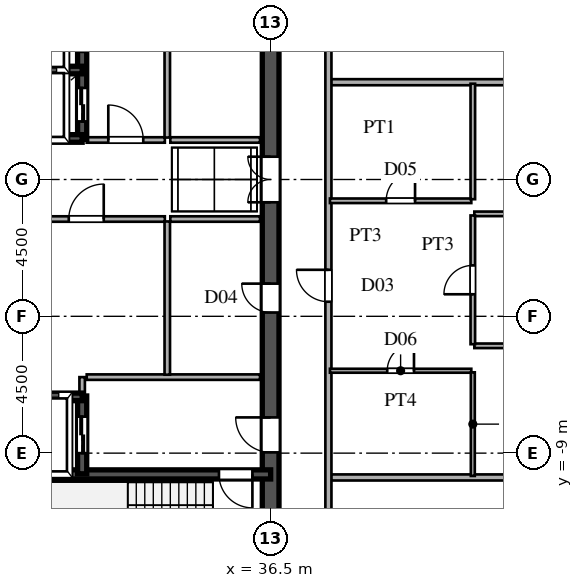
"""IFC4 building model, lengths in metres.
Left out: names, types, materials, properties, quantities, classifications, styles, units other than length and angle.
Written with IfcOpenShell. Run it as: python <this file> out.ifc"""

import sys

from ifc_helpers import new_model, si_unit, direction, frame, frame_2d, origin, place, context, subcontext, project, spatial, rectangle, extrude, source, transform, mapped, element, fill, save


model = new_model("IFC4")
c1 = context("Model", 3, precision=1e-05, world=origin(), true_north=direction((0.0, 1.0)))
c2 = subcontext(c1, "Body", "Model", "MODEL_VIEW")
j1 = project(units=[si_unit("LENGTHUNIT", "METRE"), si_unit("PLANEANGLEUNIT", "RADIAN")], contexts=[c1])
p1 = place(None, origin())
s1 = spatial("IfcSite", under=j1, at=p1, CompositionType="ELEMENT")
p2 = place(p1, origin())
s2 = spatial("IfcBuilding", under=s1, at=p2, CompositionType="ELEMENT")
p3 = place(p2, frame((0.0, 0.0, 185.1)))
s3 = spatial("IfcBuildingStorey", under=s2, at=p3, CompositionType="ELEMENT", Elevation=185.1)
p4 = place(p3, frame((36.5, -13.65, 0.0), z_axis=(0.0, 0.0, 1.0), x_axis=(0.0, 1.0, 0.0)))
e1 = element("IfcWall", 1, at=p4, inside=s3, PredefinedType="SHEAR", context=c2, shape_type="SweptSolid", body=[
    extrude(rectangle(XDim=7.15, YDim=0.55, at=frame_2d((3.575, 0.0))), origin(), (0.0, 0.0, 1.0), 3.38),
])
p5 = place(p4, frame((4.675, 0.0, 0.0)))
e2 = element("IfcOpeningElement", 2, at=p5, cuts=e1, PredefinedType="OPENING", context=c2, shape_type="SweptSolid", body=[
    extrude(rectangle(XDim=1.15, YDim=2.2, at=frame_2d((0.575, 1.1))), frame((0.0, 0.285, 0.0), z_axis=(0.0, -1.0, 0.0), x_axis=(1.0, 0.0, 0.0)), (0.0, 0.0, 1.0), 0.57),
])
p6 = place(p3, frame((36.5, -1.3, 0.0), z_axis=(0.0, 0.0, 1.0), x_axis=(0.0, 1.0, 0.0)))
e3 = element("IfcWall", 3, at=p6, inside=s3, PredefinedType="SHEAR", context=c2, shape_type="SweptSolid", body=[
    extrude(rectangle(XDim=2.6, YDim=0.55, at=frame_2d((1.3, 0.0))), origin(), (0.0, 0.0, 1.0), 3.38),
])
p7 = place(p6, frame((0.55, 0.0, 0.0)))
e4 = element("IfcOpeningElement", 4, at=p7, cuts=e3, PredefinedType="OPENING", context=c2, shape_type="SweptSolid", body=[
    extrude(rectangle(XDim=1.5, YDim=2.3, at=frame_2d((0.75, 1.15))), frame((0.0, 0.285, 0.0), z_axis=(0.0, -1.0, 0.0), x_axis=(1.0, 0.0, 0.0)), (0.0, 0.0, 1.0), 0.57),
])
p8 = place(p3, frame((36.5, -6.5, 0.0), z_axis=(0.0, 0.0, 1.0), x_axis=(0.0, 1.0, 0.0)))
e5 = element("IfcWall", 5, at=p8, inside=s3, PredefinedType="SHEAR", context=c2, shape_type="SweptSolid", body=[
    extrude(rectangle(XDim=5.2, YDim=0.55, at=frame_2d((2.6, 0.0))), origin(), (0.0, 0.0, 1.0), 3.38),
])
p9 = place(p8, frame((2.125, 0.0, 0.0)))
e6 = element("IfcOpeningElement", 6, at=p9, cuts=e5, PredefinedType="OPENING", context=c2, shape_type="SweptSolid", body=[
    extrude(rectangle(XDim=0.95, YDim=2.15, at=frame_2d((0.475, 1.075))), frame((0.0, 0.285, 0.0), z_axis=(0.0, -1.0, 0.0), x_axis=(1.0, 0.0, 0.0)), (0.0, 0.0, 1.0), 0.57),
])
p10 = place(p3, frame((36.5, 1.3, 0.0), z_axis=(0.0, 0.0, 1.0), x_axis=(0.0, 1.0, 0.0)))
e7 = element("IfcWall", 7, at=p10, inside=s3, PredefinedType="SHEAR", context=c2, shape_type="SweptSolid", body=[
    extrude(rectangle(XDim=6.9, YDim=0.55, at=frame_2d((3.45, 0.0))), origin(), (0.0, 0.0, 1.0), 3.38),
])
p11 = place(p10, frame((2.975, 0.0, 0.0)))
e8 = element("IfcOpeningElement", 8, at=p11, cuts=e7, PredefinedType="OPENING", context=c2, shape_type="SweptSolid", body=[
    extrude(rectangle(XDim=0.95, YDim=2.15, at=frame_2d((0.475, 1.075))), frame((0.0, 0.285, 0.0), z_axis=(0.0, -1.0, 0.0), x_axis=(1.0, 0.0, 0.0)), (0.0, 0.0, 1.0), 0.57),
])
p12 = place(p3, frame((27.5, -9.7, 0.0), z_axis=(0.0, 0.0, 1.0), x_axis=(1.0, 0.0, 0.0)))
e9 = element("IfcWall", 9, at=p12, inside=s3, PredefinedType="SHEAR", context=c2, shape_type="SweptSolid", body=[
    extrude(rectangle(XDim=9.0, YDim=0.3, at=frame_2d((4.5, 0.0))), origin(), (0.0, 0.0, 1.0), 3.38),
])
p13 = place(p12, frame((7.3, 0.0, 0.0)))
e10 = element("IfcOpeningElement", 10, at=p13, cuts=e9, PredefinedType="OPENING", context=c2, shape_type="SweptSolid", body=[
    extrude(rectangle(XDim=1.1, YDim=2.2, at=frame_2d((0.55, 1.1))), frame((0.0, 0.16, 0.0), z_axis=(0.0, -1.0, 0.0), x_axis=(1.0, 0.0, 0.0)), (0.0, 0.0, 1.0), 0.32),
])
for number, where, z_axis, x_axis in (
    (11, (27.5, -7.15, 0.0), (0.0, 0.0, 1.0), (1.0, 0.0, 0.0)),
    (12, (27.5, 1.35, 0.0), (0.0, 0.0, 1.0), (1.0, 0.0, 0.0)),
    (13, (27.5, 3.6, 0.0), (0.0, 0.0, 1.0), (1.0, 0.0, 0.0)),
):
    element("IfcWall", number, at=place(p3, frame(where, z_axis=z_axis, x_axis=x_axis)), inside=s3, PredefinedType="SHEAR", context=c2, shape_type="SweptSolid", body=[
        extrude(rectangle(XDim=2.8, YDim=0.25, at=frame_2d((1.4, 0.0))), origin(), (0.0, 0.0, 1.0), 3.38),
    ])
p14 = place(p3, frame((30.3, -9.68, 0.0), z_axis=(0.0, 0.0, 1.0), x_axis=(0.0, 1.0, 0.0)))
e14 = element("IfcWall", 14, at=p14, inside=s3, PredefinedType="SHEAR", context=c2, shape_type="SweptSolid", body=[
    extrude(rectangle(XDim=2.56, YDim=0.3, at=frame_2d((1.28, 0.0))), origin(), (0.0, 0.0, 1.0), 3.38),
])
p15 = place(p14, frame((0.68, 0.0, 0.0)))
e15 = element("IfcOpeningElement", 15, at=p15, cuts=e14, PredefinedType="OPENING", context=c2, shape_type="SweptSolid", body=[
    extrude(rectangle(XDim=1.2, YDim=2.25, at=frame_2d((0.6, 1.125))), frame((0.0, 0.16, 0.0), z_axis=(0.0, -1.0, 0.0), x_axis=(1.0, 0.0, 0.0)), (0.0, 0.0, 1.0), 0.32),
])
p16 = place(p3, frame((30.3, 1.32, 0.0), z_axis=(0.0, 0.0, 1.0), x_axis=(0.0, 1.0, 0.0)))
e16 = element("IfcWall", 16, at=p16, inside=s3, PredefinedType="SHEAR", context=c2, shape_type="SweptSolid", body=[
    extrude(rectangle(XDim=2.28, YDim=0.3, at=frame_2d((1.14, 0.0))), origin(), (0.0, 0.0, 1.0), 3.38),
])
p17 = place(p16, frame((0.59, 0.0, 0.0)))
e17 = element("IfcOpeningElement", 17, at=p17, cuts=e16, PredefinedType="OPENING", context=c2, shape_type="SweptSolid", body=[
    extrude(rectangle(XDim=1.1, YDim=2.2, at=frame_2d((0.55, 1.1))), frame((0.0, 0.16, 0.0), z_axis=(0.0, -1.0, 0.0), x_axis=(1.0, 0.0, 0.0)), (0.0, 0.0, 1.0), 0.32),
])
p18 = place(p3, frame((30.3, 3.6, 0.0), z_axis=(0.0, 0.0, 1.0), x_axis=(0.0, 1.0, 0.0)))
e18 = element("IfcWall", 18, at=p18, inside=s3, PredefinedType="SHEAR", context=c2, shape_type="SweptSolid", body=[
    extrude(rectangle(XDim=2.3, YDim=0.3, at=frame_2d((1.15, 0.0))), origin(), (0.0, 0.0, 1.0), 3.38),
])
p19 = place(p18, frame((0.6, 0.0, 0.0)))
e19 = element("IfcOpeningElement", 19, at=p19, cuts=e18, PredefinedType="OPENING", context=c2, shape_type="SweptSolid", body=[
    extrude(rectangle(XDim=1.1, YDim=2.2, at=frame_2d((0.55, 1.1))), frame((0.0, 0.16, 0.0), z_axis=(0.0, -1.0, 0.0), x_axis=(1.0, 0.0, 0.0)), (0.0, 0.0, 1.0), 0.32),
])
p20 = place(p3, frame((30.45, -6.5, 0.0), z_axis=(0.0, 0.0, 1.0), x_axis=(1.0, 0.0, 0.0)))
e20 = element("IfcWall", 20, at=p20, inside=s3, PredefinedType="PARTITIONING", context=c2, shape_type="SweptSolid", body=[
    extrude(rectangle(XDim=5.7, YDim=0.18, at=frame_2d((2.85, 0.0))), origin(), (0.0, 0.0, 1.0), 3.38),
])
p21 = place(p3, frame((30.3, -7.12, 0.0), z_axis=(0.0, 0.0, 1.0), x_axis=(0.0, 1.0, 0.0)))
e21 = element("IfcWall", 21, at=p21, inside=s3, PredefinedType="PARTITIONING", context=c2, shape_type="SweptSolid", body=[
    extrude(rectangle(XDim=0.62, YDim=0.18, at=frame_2d((0.31, 0.0))), origin(), (0.0, 0.0, 1.0), 3.38),
])
p22 = place(p3, frame((33.1, -6.42, 0.0), z_axis=(0.0, 0.0, 1.0), x_axis=(0.0, 1.0, 0.0)))
e22 = element("IfcWall", 22, at=p22, inside=s3, PredefinedType="PARTITIONING", context=c2, shape_type="SweptSolid", body=[
    extrude(rectangle(XDim=5.04, YDim=0.18, at=frame_2d((2.52, 0.0))), origin(), (0.0, 0.0, 1.0), 3.38),
])
p23 = place(p3, frame((33.1, 1.38, 0.0), z_axis=(0.0, 0.0, 1.0), x_axis=(0.0, 1.0, 0.0)))
e23 = element("IfcWall", 23, at=p23, inside=s3, PredefinedType="PARTITIONING", context=c2, shape_type="SweptSolid", body=[
    extrude(rectangle(XDim=6.74, YDim=0.18, at=frame_2d((3.37, 0.0))), origin(), (0.0, 0.0, 1.0), 3.38),
])
p24 = place(p3, frame((27.85, -1.3, 0.0), z_axis=(0.0, 0.0, 1.0), x_axis=(1.0, 0.0, 0.0)))
e24 = element("IfcWall", 24, at=p24, inside=s3, PredefinedType="PARTITIONING", context=c2, shape_type="SweptSolid", body=[
    extrude(rectangle(XDim=5.17, YDim=0.18, at=frame_2d((2.585, 0.0))), origin(), (0.0, 0.0, 1.0), 3.38),
])
p25 = place(p24, frame((2.01, 0.0, 0.0)))
e25 = element("IfcOpeningElement", 25, at=p25, cuts=e24, PredefinedType="OPENING", context=c2, shape_type="SweptSolid", body=[
    extrude(rectangle(XDim=1.15, YDim=2.2, at=frame_2d((0.575, 1.1))), frame((0.0, 0.1, 0.0), z_axis=(0.0, -1.0, 0.0), x_axis=(1.0, 0.0, 0.0)), (0.0, 0.0, 1.0), 0.2),
])
p26 = place(p3, frame((30.45, 1.3, 0.0), z_axis=(0.0, 0.0, 1.0), x_axis=(1.0, 0.0, 0.0)))
e26 = element("IfcWall", 26, at=p26, inside=s3, PredefinedType="PARTITIONING", context=c2, shape_type="SweptSolid", body=[
    extrude(rectangle(XDim=2.57, YDim=0.18, at=frame_2d((1.285, 0.0))), origin(), (0.0, 0.0, 1.0), 3.38),
])
p27 = place(p26, frame((0.71, 0.0, 0.0)))
e27 = element("IfcOpeningElement", 27, at=p27, cuts=e26, PredefinedType="OPENING", context=c2, shape_type="SweptSolid", body=[
    extrude(rectangle(XDim=1.15, YDim=2.2, at=frame_2d((0.575, 1.1))), frame((0.0, 0.1, 0.0), z_axis=(0.0, -1.0, 0.0), x_axis=(1.0, 0.0, 0.0)), (0.0, 0.0, 1.0), 0.2),
])
for number, where, z_axis, x_axis in (
    (28, (33.2, -1.3, 0.0), (0.0, 0.0, 1.0), (1.0, 0.0, 0.0)),
    (29, (33.2, 1.3, 0.0), (0.0, 0.0, 1.0), (1.0, 0.0, 0.0)),
):
    element("IfcWall", number, at=place(p3, frame(where, z_axis=z_axis, x_axis=x_axis)), inside=s3, PredefinedType="PARTITIONING", context=c2, shape_type="SweptSolid", body=[
        extrude(rectangle(XDim=2.95, YDim=0.18, at=frame_2d((1.475, 0.0))), origin(), (0.0, 0.0, 1.0), 3.38),
    ])
p28 = place(p3, frame((38.48, -9.8, 0.0), z_axis=(0.0, 0.0, 1.0), x_axis=(1.0, 0.0, 0.0)))
e30 = element("IfcWall", 30, at=p28, inside=s3, PredefinedType="PARTITIONING", context=c2, shape_type="SweptSolid", body=[
    extrude(rectangle(XDim=18.163, YDim=0.2, at=frame_2d((9.082, 0.0))), origin(), (0.0, 0.0, 1.0), 3.38),
])
p29 = place(p3, frame((38.45, -6.29, 0.0), z_axis=(0.0, 0.0, 1.0), x_axis=(1.0, 0.0, 0.0)))
e31 = element("IfcWall", 31, at=p29, inside=s3, PredefinedType="PARTITIONING", context=c2, shape_type="SweptSolid", body=[
    extrude(rectangle(XDim=4.65, YDim=0.13, at=frame_2d((2.325, 0.0))), origin(), (0.0, 0.0, 1.0), 3.38),
])
p30 = place(p29, frame((1.885, 0.0, 0.0)))
e32 = element("IfcOpeningElement", 32, at=p30, cuts=e31, PredefinedType="OPENING", context=c2, shape_type="SweptSolid", body=[
    extrude(rectangle(XDim=0.88, YDim=2.1, at=frame_2d((0.44, 1.05))), frame((0.0, 0.075, 0.0), z_axis=(0.0, -1.0, 0.0), x_axis=(1.0, 0.0, 0.0)), (0.0, 0.0, 1.0), 0.15),
])
p31 = place(p3, frame((43.2, -5.47, 0.0), z_axis=(0.0, 0.0, 1.0), x_axis=(1.0, 0.0, 0.0)))
e33 = element("IfcWall", 33, at=p31, inside=s3, PredefinedType="PARTITIONING", context=c2, shape_type="SweptSolid", body=[
    extrude(rectangle(XDim=21.259, YDim=0.15, at=frame_2d((10.629, 0.0))), origin(), (0.0, 0.0, 1.0), 3.38),
])
p32 = place(p31, frame((5.15, 0.0, 0.0)))
e34 = element("IfcOpeningElement", 34, at=p32, cuts=e33, PredefinedType="OPENING", context=c2, shape_type="SweptSolid", body=[
    extrude(rectangle(XDim=0.95, YDim=2.15, at=frame_2d((0.475, 1.075))), frame((0.0, 0.085, 0.0), z_axis=(0.0, -1.0, 0.0), x_axis=(1.0, 0.0, 0.0)), (0.0, 0.0, 1.0), 0.17),
])
p33 = place(p31, frame((13.675, 0.0, 0.0)))
e35 = element("IfcOpeningElement", 35, at=p33, cuts=e33, PredefinedType="OPENING", context=c2, shape_type="SweptSolid", body=[
    extrude(rectangle(XDim=0.95, YDim=2.15, at=frame_2d((0.475, 1.075))), frame((0.0, 0.085, 0.0), z_axis=(0.0, -1.0, 0.0), x_axis=(1.0, 0.0, 0.0)), (0.0, 0.0, 1.0), 0.17),
])
p34 = place(p3, frame((43.2, -1.13, 0.0), z_axis=(0.0, 0.0, 1.0), x_axis=(1.0, 0.0, 0.0)))
e36 = element("IfcWall", 36, at=p34, inside=s3, PredefinedType="PARTITIONING", context=c2, shape_type="SweptSolid", body=[
    extrude(rectangle(XDim=25.335, YDim=0.15, at=frame_2d((12.667, 0.0))), origin(), (0.0, 0.0, 1.0), 3.38),
])
p35 = place(p34, frame((5.15, 0.0, 0.0)))
e37 = element("IfcOpeningElement", 37, at=p35, cuts=e36, PredefinedType="OPENING", context=c2, shape_type="SweptSolid", body=[
    extrude(rectangle(XDim=0.95, YDim=2.15, at=frame_2d((0.475, 1.075))), frame((0.0, 0.085, 0.0), z_axis=(0.0, -1.0, 0.0), x_axis=(1.0, 0.0, 0.0)), (0.0, 0.0, 1.0), 0.17),
])
p36 = place(p34, frame((20.675, 0.0, 0.0)))
e38 = element("IfcOpeningElement", 38, at=p36, cuts=e36, PredefinedType="OPENING", context=c2, shape_type="SweptSolid", body=[
    extrude(rectangle(XDim=0.95, YDim=2.15, at=frame_2d((0.475, 1.075))), frame((0.0, 0.085, 0.0), z_axis=(0.0, -1.0, 0.0), x_axis=(1.0, 0.0, 0.0)), (0.0, 0.0, 1.0), 0.17),
])
p37 = place(p34, frame((13.675, 0.0, 0.0)))
e39 = element("IfcOpeningElement", 39, at=p37, cuts=e36, PredefinedType="OPENING", context=c2, shape_type="SweptSolid", body=[
    extrude(rectangle(XDim=0.95, YDim=2.15, at=frame_2d((0.475, 1.075))), frame((0.0, 0.085, 0.0), z_axis=(0.0, -1.0, 0.0), x_axis=(1.0, 0.0, 0.0)), (0.0, 0.0, 1.0), 0.17),
])
p38 = place(p3, frame((38.45, -0.7, 0.0), z_axis=(0.0, 0.0, 1.0), x_axis=(1.0, 0.0, 0.0)))
e40 = element("IfcWall", 40, at=p38, inside=s3, PredefinedType="PARTITIONING", context=c2, shape_type="SweptSolid", body=[
    extrude(rectangle(XDim=4.65, YDim=0.15, at=frame_2d((2.325, 0.0))), origin(), (0.0, 0.0, 1.0), 3.38),
])
p39 = place(p38, frame((1.85, 0.0, 0.0)))
e41 = element("IfcOpeningElement", 41, at=p39, cuts=e40, PredefinedType="OPENING", context=c2, shape_type="SweptSolid", body=[
    extrude(rectangle(XDim=0.95, YDim=2.15, at=frame_2d((0.475, 1.075))), frame((0.0, 0.085, 0.0), z_axis=(0.0, -1.0, 0.0), x_axis=(1.0, 0.0, 0.0)), (0.0, 0.0, 1.0), 0.17),
])
p40 = place(p3, frame((38.48, 3.2, 0.0), z_axis=(0.0, 0.0, 1.0), x_axis=(1.0, 0.0, 0.0)))
e42 = element("IfcWall", 42, at=p40, inside=s3, PredefinedType="PARTITIONING", context=c2, shape_type="SweptSolid", body=[
    extrude(rectangle(XDim=29.763, YDim=0.2, at=frame_2d((14.881, 0.0))), origin(), (0.0, 0.0, 1.0), 3.38),
])
p41 = place(p3, frame((38.4, -15.715, 0.0), z_axis=(0.0, 0.0, 1.0), x_axis=(0.0, 1.0, 0.0)))
e43 = element("IfcWall", 43, at=p41, inside=s3, PredefinedType="PARTITIONING", context=c2, shape_type="SweptSolid", body=[
    extrude(rectangle(XDim=31.43, YDim=0.2, at=frame_2d((15.715, 0.0))), origin(), (0.0, 0.0, 1.0), 3.38),
])
p42 = place(p41, frame((2.39, 0.0, 0.0)))
e44 = element("IfcOpeningElement", 44, at=p42, cuts=e43, PredefinedType="OPENING", context=c2, shape_type="SweptSolid", body=[
    extrude(rectangle(XDim=1.05, YDim=2.25, at=frame_2d((0.525, 1.125))), frame((0.0, 0.11, 0.0), z_axis=(0.0, -1.0, 0.0), x_axis=(1.0, 0.0, 0.0)), (0.0, 0.0, 1.0), 0.22),
])
p43 = place(p41, frame((11.695, 0.0, 0.0)))
e45 = element("IfcOpeningElement", 45, at=p43, cuts=e43, PredefinedType="OPENING", context=c2, shape_type="SweptSolid", body=[
    extrude(rectangle(XDim=1.05, YDim=2.25, at=frame_2d((0.525, 1.125))), frame((0.0, 0.11, 0.0), z_axis=(0.0, -1.0, 0.0), x_axis=(1.0, 0.0, 0.0)), (0.0, 0.0, 1.0), 0.22),
])
p44 = place(p41, frame((24.69, 0.0, 0.0)))
e46 = element("IfcOpeningElement", 46, at=p44, cuts=e43, PredefinedType="OPENING", context=c2, shape_type="SweptSolid", body=[
    extrude(rectangle(XDim=1.05, YDim=2.25, at=frame_2d((0.525, 1.125))), frame((0.0, 0.11, 0.0), z_axis=(0.0, -1.0, 0.0), x_axis=(1.0, 0.0, 0.0)), (0.0, 0.0, 1.0), 0.22),
])
p45 = place(p3, frame((43.15, -9.75, 0.0), z_axis=(0.0, 0.0, 1.0), x_axis=(0.0, 1.0, 0.0)))
e47 = element("IfcWall", 47, at=p45, inside=s3, PredefinedType="PARTITIONING", context=c2, shape_type="SweptSolid", body=[
    extrude(rectangle(XDim=3.408, YDim=0.13, at=frame_2d((1.704, 0.0))), origin(), (0.0, 0.0, 1.0), 3.38),
])
p46 = place(p3, frame((43.15, -5.417, 0.0), z_axis=(0.0, 0.0, 1.0), x_axis=(0.0, 1.0, 0.0)))
e48 = element("IfcWall", 48, at=p46, inside=s3, PredefinedType="PARTITIONING", context=c2, shape_type="SweptSolid", body=[
    extrude(rectangle(XDim=4.234, YDim=0.15, at=frame_2d((2.117, 0.0))), origin(), (0.0, 0.0, 1.0), 2.99),
])
p47 = place(p46, frame((1.642, 0.0, 0.0)))
e49 = element("IfcOpeningElement", 49, at=p47, cuts=e48, PredefinedType="OPENING", context=c2, shape_type="SweptSolid", body=[
    extrude(rectangle(XDim=0.95, YDim=2.15, at=frame_2d((0.475, 1.075))), frame((0.0, 0.085, 0.0), z_axis=(0.0, -1.0, 0.0), x_axis=(1.0, 0.0, 0.0)), (0.0, 0.0, 1.0), 0.17),
])
p48 = place(p3, frame((43.15, -0.648, 0.0), z_axis=(0.0, 0.0, 1.0), x_axis=(0.0, 1.0, 0.0)))
e50 = element("IfcWall", 50, at=p48, inside=s3, PredefinedType="PARTITIONING", context=c2, shape_type="SweptSolid", body=[
    extrude(rectangle(XDim=3.798, YDim=0.15, at=frame_2d((1.899, 0.0))), origin(), (0.0, 0.0, 1.0), 3.38),
])
m1 = source(origin(), c2, "Body", "SweptSolid", [
    extrude(rectangle(XDim=1.15, YDim=2.2, at=frame_2d((0.575, 1.1))), frame((0.0, 0.025, 0.0), z_axis=(0.0, -1.0, 0.0), x_axis=(1.0, 0.0, 0.0)), (0.0, 0.0, 1.0), 0.05),
])
p49 = place(p5, origin())
e51 = element("IfcDoor", 51, at=p49, inside=s3, OperationType="SINGLE_SWING_RIGHT", PredefinedType="DOOR", context=c2, shape_type="MappedRepresentation", body=[
    mapped(m1, transform((0.0, 0.0, 0.0), scale=1.0)),
])
fill(e2, e51)
m2 = source(origin(), c2, "Body", "SweptSolid", [
    extrude(rectangle(XDim=1.5, YDim=2.3, at=frame_2d((0.75, 1.15))), frame((0.0, 0.025, 0.0), z_axis=(0.0, -1.0, 0.0), x_axis=(1.0, 0.0, 0.0)), (0.0, 0.0, 1.0), 0.05),
])
p50 = place(p7, origin())
e52 = element("IfcDoor", 52, at=p50, inside=s3, OperationType="DOUBLE_SWING_LEFT", PredefinedType="DOOR", context=c2, shape_type="MappedRepresentation", body=[
    mapped(m2, transform((0.0, 0.0, 0.0), scale=1.0)),
])
fill(e4, e52)
m3 = source(origin(), c2, "Body", "SweptSolid", [
    extrude(rectangle(XDim=0.95, YDim=2.15, at=frame_2d((0.475, 1.075))), frame((0.0, 0.025, 0.0), z_axis=(0.0, -1.0, 0.0), x_axis=(1.0, 0.0, 0.0)), (0.0, 0.0, 1.0), 0.05),
])
p51 = place(p9, origin())
e53 = element("IfcDoor", 53, at=p51, inside=s3, OperationType="SINGLE_SWING_RIGHT", PredefinedType="DOOR", context=c2, shape_type="MappedRepresentation", body=[
    mapped(m3, transform((0.0, 0.0, 0.0), scale=1.0)),
])
fill(e6, e53)
m4 = source(origin(), c2, "Body", "SweptSolid", [
    extrude(rectangle(XDim=1.1, YDim=2.2, at=frame_2d((0.55, 1.1))), frame((0.0, 0.025, 0.0), z_axis=(0.0, -1.0, 0.0), x_axis=(1.0, 0.0, 0.0)), (0.0, 0.0, 1.0), 0.05),
])
p52 = place(p13, frame((1.1, 0.0, 0.0), z_axis=(0.0, 0.0, 1.0), x_axis=(-1.0, 0.0, 0.0)))
e54 = element("IfcDoor", 54, at=p52, inside=s3, OperationType="SINGLE_SWING_RIGHT", PredefinedType="DOOR", context=c2, shape_type="MappedRepresentation", body=[
    mapped(m4, transform((0.0, 0.0, 0.0), scale=1.0)),
])
fill(e10, e54)
m5 = source(origin(), c2, "Body", "SweptSolid", [
    extrude(rectangle(XDim=1.2, YDim=2.25, at=frame_2d((0.6, 1.125))), frame((0.0, 0.025, 0.0), z_axis=(0.0, -1.0, 0.0), x_axis=(1.0, 0.0, 0.0)), (0.0, 0.0, 1.0), 0.05),
])
p53 = place(p15, origin())
e55 = element("IfcDoor", 55, at=p53, inside=s3, OperationType="DOUBLE_DOOR_SLIDING", PredefinedType="DOOR", context=c2, shape_type="MappedRepresentation", body=[
    mapped(m5, transform((0.0, 0.0, 0.0), scale=1.0)),
])
fill(e15, e55)
m6 = source(origin(), c2, "Body", "SweptSolid", [
    extrude(rectangle(XDim=1.1, YDim=2.2, at=frame_2d((0.55, 1.1))), frame((0.0, 0.025, 0.0), z_axis=(0.0, -1.0, 0.0), x_axis=(1.0, 0.0, 0.0)), (0.0, 0.0, 1.0), 0.05),
])
p54 = place(p17, origin())
e56 = element("IfcDoor", 56, at=p54, inside=s3, OperationType="DOUBLE_DOOR_SLIDING", PredefinedType="DOOR", context=c2, shape_type="MappedRepresentation", body=[
    mapped(m6, transform((0.0, 0.0, 0.0), scale=1.0)),
])
fill(e17, e56)
p55 = place(p25, origin())
e57 = element("IfcDoor", 57, at=p55, inside=s3, OperationType="SINGLE_SWING_RIGHT", PredefinedType="DOOR", context=c2, shape_type="MappedRepresentation", body=[
    mapped(m1, transform((0.0, 0.0, 0.0), scale=1.0)),
])
fill(e25, e57)
p56 = place(p27, origin())
e58 = element("IfcDoor", 58, at=p56, inside=s3, OperationType="SINGLE_SWING_LEFT", PredefinedType="DOOR", context=c2, shape_type="MappedRepresentation", body=[
    mapped(m1, transform((0.0, 0.0, 0.0), scale=1.0)),
])
fill(e27, e58)
m7 = source(origin(), c2, "Body", "SweptSolid", [
    extrude(rectangle(XDim=0.88, YDim=2.1, at=frame_2d((0.44, 1.05))), frame((0.0, 0.025, 0.0), z_axis=(0.0, -1.0, 0.0), x_axis=(1.0, 0.0, 0.0)), (0.0, 0.0, 1.0), 0.05),
])
p57 = place(p30, origin())
e59 = element("IfcDoor", 59, at=p57, inside=s3, OperationType="SINGLE_SWING_RIGHT", PredefinedType="DOOR", context=c2, shape_type="MappedRepresentation", body=[
    mapped(m7, transform((0.0, 0.0, 0.0), scale=1.0)),
])
fill(e32, e59)
m8 = source(origin(), c2, "Body", "SweptSolid", [
    extrude(rectangle(XDim=0.95, YDim=2.15, at=frame_2d((0.475, 1.075))), frame((0.0, 0.025, 0.0), z_axis=(0.0, -1.0, 0.0), x_axis=(1.0, 0.0, 0.0)), (0.0, 0.0, 1.0), 0.05),
])
p58 = place(p39, origin())
e60 = element("IfcDoor", 60, at=p58, inside=s3, OperationType="SINGLE_SWING_RIGHT", PredefinedType="DOOR", context=c2, shape_type="MappedRepresentation", body=[
    mapped(m8, transform((0.0, 0.0, 0.0), scale=1.0)),
])
fill(e41, e60)
m9 = source(origin(), c2, "Body", "SweptSolid", [
    extrude(rectangle(XDim=1.05, YDim=2.25, at=frame_2d((0.525, 1.125))), frame((0.0, 0.025, 0.0), z_axis=(0.0, -1.0, 0.0), x_axis=(1.0, 0.0, 0.0)), (0.0, 0.0, 1.0), 0.05),
])
p59 = place(p43, origin())
e61 = element("IfcDoor", 61, at=p59, inside=s3, OperationType="SINGLE_SWING_RIGHT", PredefinedType="DOOR", context=c2, shape_type="MappedRepresentation", body=[
    mapped(m9, transform((0.0, 0.0, 0.0), scale=1.0)),
])
fill(e45, e61)
p60 = place(p47, origin())
e62 = element("IfcDoor", 62, at=p60, inside=s3, OperationType="SINGLE_SWING_LEFT", PredefinedType="DOOR", context=c2, shape_type="MappedRepresentation", body=[
    mapped(m8, transform((0.0, 0.0, 0.0), scale=1.0)),
])
fill(e49, e62)
save(model, sys.argv[1])
